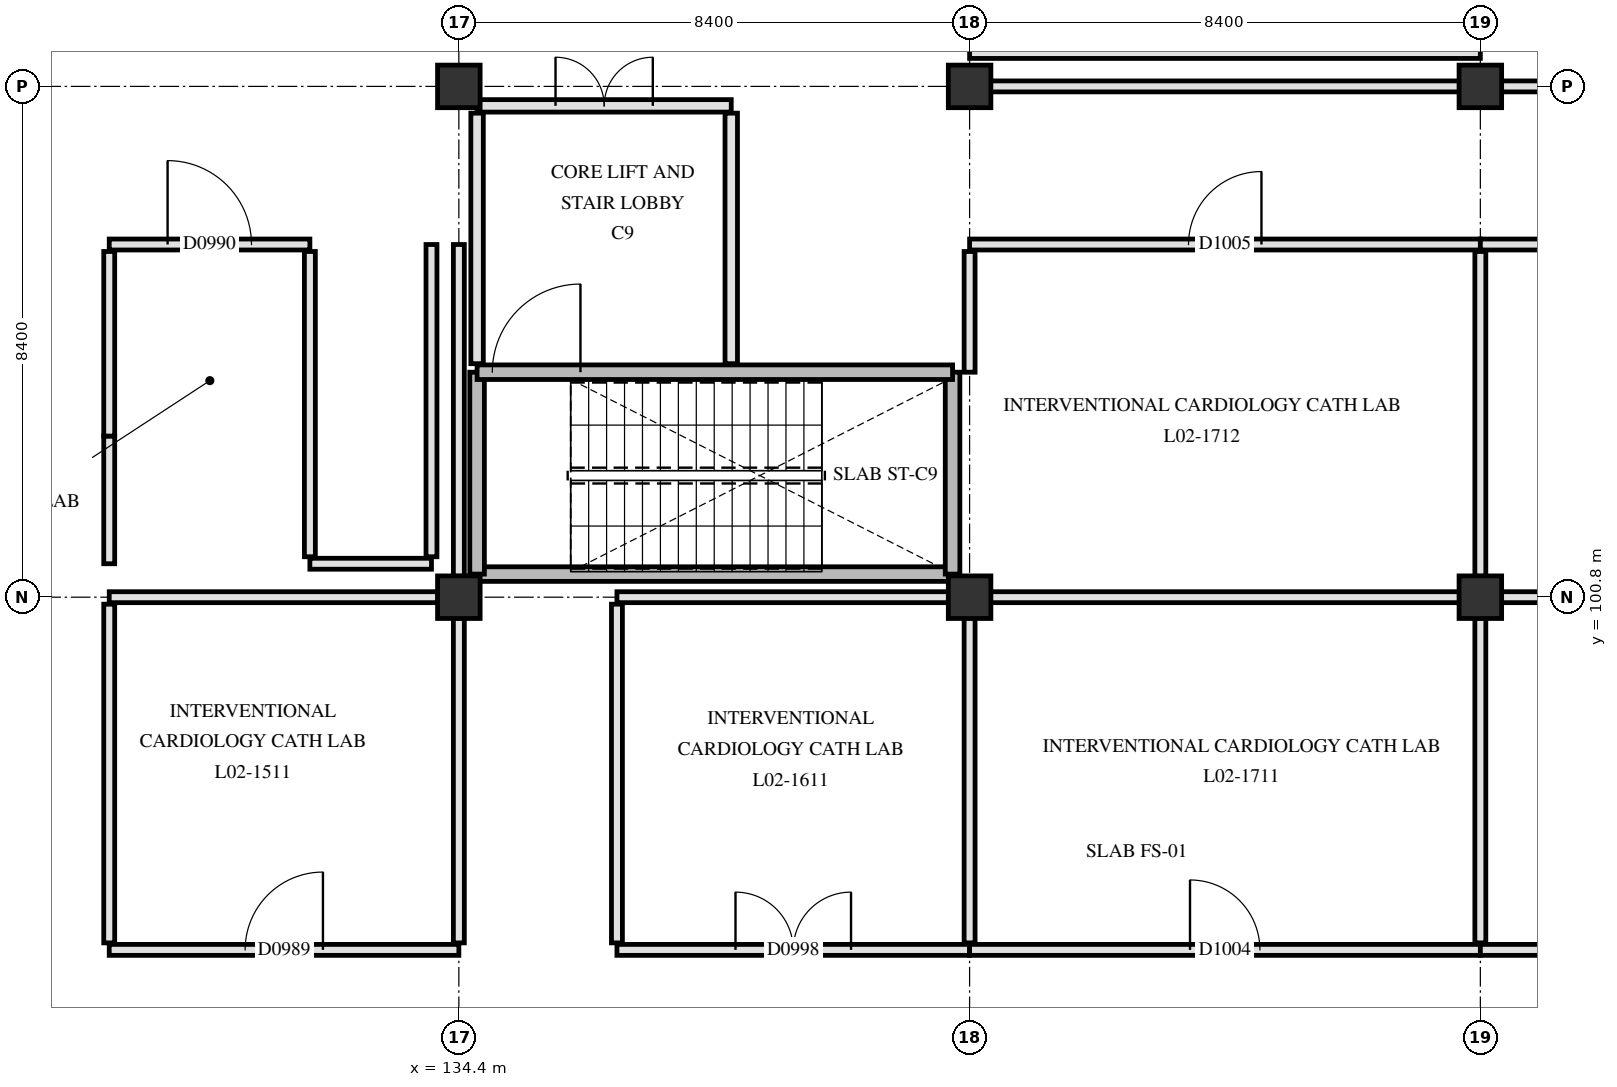
"""IFC4 building model, lengths in metres.
Left out: names, types, materials, properties, quantities, classifications, styles, units other than length and angle.
Written with IfcOpenShell. Run it as: python <this file> out.ifc"""

import sys

from ifc_helpers import new_model, si_unit, direction, frame, frame_2d, origin, origin_2d, place, context, subcontext, project, spatial, rectangle, extrude, element, fill, save


model = new_model("IFC4")
c1 = context("Model", 3, precision=1e-05, world=origin(), true_north=direction((0.0, 1.0)))
c2 = subcontext(c1, "Body", "Model", "MODEL_VIEW")
j1 = project(units=[si_unit("LENGTHUNIT", "METRE"), si_unit("PLANEANGLEUNIT", "RADIAN")], contexts=[c1])
p1 = place(None, origin())
s1 = spatial("IfcSite", under=j1, at=p1, CompositionType="ELEMENT")
p2 = place(p1, origin())
s2 = spatial("IfcBuilding", under=s1, at=p2, CompositionType="ELEMENT")
p3 = place(p2, frame((0.0, 0.0, 9.3)))
s3 = spatial("IfcBuildingStorey", under=s2, at=p3, CompositionType="ELEMENT", Elevation=9.3)
for number, where, z_axis, x_axis in (
    (1, (134.4, 100.8, 0.0), (0.0, 0.0, 1.0), (1.0, 0.0, 0.0)),
    (2, (134.4, 109.2, 0.0), (0.0, 0.0, 1.0), (1.0, 0.0, 0.0)),
    (3, (142.8, 100.8, 0.0), (0.0, 0.0, 1.0), (1.0, 0.0, 0.0)),
    (4, (142.8, 109.2, 0.0), (0.0, 0.0, 1.0), (1.0, 0.0, 0.0)),
    (5, (151.2, 100.8, 0.0), (0.0, 0.0, 1.0), (1.0, 0.0, 0.0)),
    (6, (151.2, 109.2, 0.0), (0.0, 0.0, 1.0), (1.0, 0.0, 0.0)),
):
    element("IfcColumn", number, at=place(p3, frame(where, z_axis=z_axis, x_axis=x_axis)), inside=s3, PredefinedType="COLUMN", context=c2, shape_type="SweptSolid", body=[
        extrude(rectangle(XDim=0.7, YDim=0.7, at=origin_2d()), origin(), (0.0, 0.0, 1.0), 5.1),
    ])
p4 = place(p3, frame((134.7, 101.18, 0.0), z_axis=(0.0, 0.0, 1.0), x_axis=(1.0, 0.0, 0.0)))
e7 = element("IfcWall", 7, at=p4, inside=s3, PredefinedType="SHEAR", context=c2, shape_type="SweptSolid", body=[
    extrude(rectangle(XDim=7.82, YDim=0.24, at=frame_2d((3.91, 0.0))), origin(), (0.0, 0.0, 1.0), 4.78),
])
for number, where, z_axis, x_axis in (
    (8, (134.7, 101.18, 0.0), (0.0, 0.0, 1.0), (0.0, 1.0, 0.0)),
    (9, (142.52, 101.18, 0.0), (0.0, 0.0, 1.0), (0.0, 1.0, 0.0)),
):
    element("IfcWall", number, at=place(p3, frame(where, z_axis=z_axis, x_axis=x_axis)), inside=s3, PredefinedType="SHEAR", context=c2, shape_type="SweptSolid", body=[
        extrude(rectangle(XDim=3.32, YDim=0.24, at=frame_2d((1.66, 0.0))), origin(), (0.0, 0.0, 1.0), 4.78),
    ])
p5 = place(p3, frame((134.7, 104.5, 0.0), z_axis=(0.0, 0.0, 1.0), x_axis=(1.0, 0.0, 0.0)))
e10 = element("IfcWall", 10, at=p5, inside=s3, PredefinedType="SHEAR", context=c2, shape_type="SweptSolid", body=[
    extrude(rectangle(XDim=7.82, YDim=0.24, at=frame_2d((3.91, 0.0))), origin(), (0.0, 0.0, 1.0), 4.78),
])
p6 = place(p5, frame((0.25, 0.0, 0.0)))
e11 = element("IfcOpeningElement", 11, at=p6, cuts=e10, PredefinedType="OPENING", context=c2, shape_type="SweptSolid", body=[
    extrude(rectangle(XDim=1.45, YDim=2.2, at=frame_2d((0.725, 1.1))), frame((0.0, 0.13, 0.0), z_axis=(0.0, -1.0, 0.0), x_axis=(1.0, 0.0, 0.0)), (0.0, 0.0, 1.0), 0.26),
])
p7 = place(p3, frame((138.88, 104.64, 0.0), z_axis=(0.0, 0.0, 1.0), x_axis=(0.0, 1.0, 0.0)))
e12 = element("IfcWall", 12, at=p7, inside=s3, PredefinedType="PARTITIONING", context=c2, shape_type="SweptSolid", body=[
    extrude(rectangle(XDim=4.12, YDim=0.205, at=frame_2d((2.06, 0.0))), origin(), (0.0, 0.0, 1.0), 4.77),
])
p8 = place(p3, frame((134.7, 104.64, 0.0), z_axis=(0.0, 0.0, 1.0), x_axis=(0.0, 1.0, 0.0)))
e13 = element("IfcWall", 13, at=p8, inside=s3, PredefinedType="PARTITIONING", context=c2, shape_type="SweptSolid", body=[
    extrude(rectangle(XDim=4.12, YDim=0.205, at=frame_2d((2.06, 0.0))), origin(), (0.0, 0.0, 1.0), 4.17),
])
p9 = place(p3, frame((134.7, 108.88, 0.0), z_axis=(0.0, 0.0, 1.0), x_axis=(1.0, 0.0, 0.0)))
e14 = element("IfcWall", 14, at=p9, inside=s3, PredefinedType="PARTITIONING", context=c2, shape_type="SweptSolid", body=[
    extrude(rectangle(XDim=4.18, YDim=0.205, at=frame_2d((2.09, 0.0))), origin(), (0.0, 0.0, 1.0), 4.17),
])
p10 = place(p9, frame((1.29, 0.0, 0.0)))
e15 = element("IfcOpeningElement", 15, at=p10, cuts=e14, PredefinedType="OPENING", context=c2, shape_type="SweptSolid", body=[
    extrude(rectangle(XDim=1.6, YDim=2.25, at=frame_2d((0.8, 1.125))), frame((0.0, 0.113, 0.0), z_axis=(0.0, -1.0, 0.0), x_axis=(1.0, 0.0, 0.0)), (0.0, 0.0, 1.0), 0.225),
])
p11 = place(p3, frame((128.65, 95.0, 0.0), z_axis=(0.0, 0.0, 1.0), x_axis=(1.0, 0.0, 0.0)))
e16 = element("IfcWall", 16, at=p11, inside=s3, PredefinedType="PARTITIONING", context=c2, shape_type="SweptSolid", body=[
    extrude(rectangle(XDim=5.75, YDim=0.18, at=frame_2d((2.875, 0.0))), origin(), (0.0, 0.0, 1.0), 4.17),
])
p12 = place(p11, frame((2.235, 0.0, 0.0)))
e17 = element("IfcOpeningElement", 17, at=p12, cuts=e16, PredefinedType="OPENING", context=c2, shape_type="SweptSolid", body=[
    extrude(rectangle(XDim=1.28, YDim=2.18, at=frame_2d((0.64, 1.09))), frame((0.0, 0.1, 0.0), z_axis=(0.0, -1.0, 0.0), x_axis=(1.0, 0.0, 0.0)), (0.0, 0.0, 1.0), 0.2),
])
p13 = place(p3, frame((137.0, 95.0, 0.0), z_axis=(0.0, 0.0, 1.0), x_axis=(1.0, 0.0, 0.0)))
e18 = element("IfcWall", 18, at=p13, inside=s3, PredefinedType="PARTITIONING", context=c2, shape_type="SweptSolid", body=[
    extrude(rectangle(XDim=5.8, YDim=0.18, at=frame_2d((2.9, 0.0))), origin(), (0.0, 0.0, 1.0), 4.17),
])
p14 = place(p13, frame((1.95, 0.0, 0.0)))
e19 = element("IfcOpeningElement", 19, at=p14, cuts=e18, PredefinedType="OPENING", context=c2, shape_type="SweptSolid", body=[
    extrude(rectangle(XDim=1.9, YDim=2.3, at=frame_2d((0.95, 1.15))), frame((0.0, 0.1, 0.0), z_axis=(0.0, -1.0, 0.0), x_axis=(1.0, 0.0, 0.0)), (0.0, 0.0, 1.0), 0.2),
])
p15 = place(p3, frame((142.8, 95.0, 0.0), z_axis=(0.0, 0.0, 1.0), x_axis=(1.0, 0.0, 0.0)))
e20 = element("IfcWall", 20, at=p15, inside=s3, PredefinedType="PARTITIONING", context=c2, shape_type="SweptSolid", body=[
    extrude(rectangle(XDim=8.4, YDim=0.18, at=frame_2d((4.2, 0.0))), origin(), (0.0, 0.0, 1.0), 4.17),
])
p16 = place(p15, frame((3.625, 0.0, 0.0)))
e21 = element("IfcOpeningElement", 21, at=p16, cuts=e20, PredefinedType="OPENING", context=c2, shape_type="SweptSolid", body=[
    extrude(rectangle(XDim=1.15, YDim=2.15, at=frame_2d((0.575, 1.075))), frame((0.0, 0.1, 0.0), z_axis=(0.0, -1.0, 0.0), x_axis=(1.0, 0.0, 0.0)), (0.0, 0.0, 1.0), 0.2),
])
p17 = place(p3, frame((151.2, 95.0, 0.0), z_axis=(0.0, 0.0, 1.0), x_axis=(1.0, 0.0, 0.0)))
e22 = element("IfcWall", 22, at=p17, inside=s3, PredefinedType="PARTITIONING", context=c2, shape_type="SweptSolid", body=[
    extrude(rectangle(XDim=8.4, YDim=0.18, at=frame_2d((4.2, 0.0))), origin(), (0.0, 0.0, 1.0), 4.17),
])
p18 = place(p17, frame((3.33, 0.0, 0.0)))
e23 = element("IfcOpeningElement", 23, at=p18, cuts=e22, PredefinedType="OPENING", context=c2, shape_type="SweptSolid", body=[
    extrude(rectangle(XDim=1.74, YDim=2.24, at=frame_2d((0.87, 1.12))), frame((0.0, 0.1, 0.0), z_axis=(0.0, -1.0, 0.0), x_axis=(1.0, 0.0, 0.0)), (0.0, 0.0, 1.0), 0.2),
])
p19 = place(p3, frame((128.65, 100.8, 0.0), z_axis=(0.0, 0.0, 1.0), x_axis=(1.0, 0.0, 0.0)))
e24 = element("IfcWall", 24, at=p19, inside=s3, PredefinedType="PARTITIONING", context=c2, shape_type="SweptSolid", body=[
    extrude(rectangle(XDim=5.405, YDim=0.18, at=frame_2d((2.703, 0.0))), origin(), (0.0, 0.0, 1.0), 4.17),
])
p20 = place(p3, frame((137.0, 100.8, 0.0), z_axis=(0.0, 0.0, 1.0), x_axis=(1.0, 0.0, 0.0)))
e25 = element("IfcWall", 25, at=p20, inside=s3, PredefinedType="PARTITIONING", context=c2, shape_type="SweptSolid", body=[
    extrude(rectangle(XDim=5.455, YDim=0.18, at=frame_2d((2.728, 0.0))), origin(), (0.0, 0.0, 1.0), 4.17),
])
p21 = place(p3, frame((143.145, 100.8, 0.0), z_axis=(0.0, 0.0, 1.0), x_axis=(1.0, 0.0, 0.0)))
e26 = element("IfcWall", 26, at=p21, inside=s3, PredefinedType="PARTITIONING", context=c2, shape_type="SweptSolid", body=[
    extrude(rectangle(XDim=7.71, YDim=0.18, at=frame_2d((3.855, 0.0))), origin(), (0.0, 0.0, 1.0), 4.17),
])
p22 = place(p3, frame((151.545, 100.8, 0.0), z_axis=(0.0, 0.0, 1.0), x_axis=(1.0, 0.0, 0.0)))
e27 = element("IfcWall", 27, at=p22, inside=s3, PredefinedType="PARTITIONING", context=c2, shape_type="SweptSolid", body=[
    extrude(rectangle(XDim=7.76, YDim=0.18, at=frame_2d((3.88, 0.0))), origin(), (0.0, 0.0, 1.0), 4.17),
])
p23 = place(p3, frame((131.95, 101.35, 0.0), z_axis=(0.0, 0.0, 1.0), x_axis=(1.0, 0.0, 0.0)))
e28 = element("IfcWall", 28, at=p23, inside=s3, PredefinedType="PARTITIONING", context=c2, shape_type="SweptSolid", body=[
    extrude(rectangle(XDim=2.0, YDim=0.18, at=frame_2d((1.0, 0.0))), origin(), (0.0, 0.0, 1.0), 4.77),
])
p24 = place(p3, frame((128.65, 106.6, 0.0), z_axis=(0.0, 0.0, 1.0), x_axis=(1.0, 0.0, 0.0)))
e29 = element("IfcWall", 29, at=p24, inside=s3, PredefinedType="PARTITIONING", context=c2, shape_type="SweptSolid", body=[
    extrude(rectangle(XDim=3.3, YDim=0.18, at=frame_2d((1.65, 0.0))), origin(), (0.0, 0.0, 1.0), 4.77),
])
p25 = place(p24, frame((0.96, 0.0, 0.0)))
e30 = element("IfcOpeningElement", 30, at=p25, cuts=e29, PredefinedType="OPENING", context=c2, shape_type="SweptSolid", body=[
    extrude(rectangle(XDim=1.38, YDim=2.22, at=frame_2d((0.69, 1.11))), frame((0.0, 0.1, 0.0), z_axis=(0.0, -1.0, 0.0), x_axis=(1.0, 0.0, 0.0)), (0.0, 0.0, 1.0), 0.2),
])
p26 = place(p3, frame((142.8, 106.6, 0.0), z_axis=(0.0, 0.0, 1.0), x_axis=(1.0, 0.0, 0.0)))
e31 = element("IfcWall", 31, at=p26, inside=s3, PredefinedType="PARTITIONING", context=c2, shape_type="SweptSolid", body=[
    extrude(rectangle(XDim=8.4, YDim=0.18, at=frame_2d((4.2, 0.0))), origin(), (0.0, 0.0, 1.0), 4.17),
])
p27 = place(p26, frame((3.6, 0.0, 0.0)))
e32 = element("IfcOpeningElement", 32, at=p27, cuts=e31, PredefinedType="OPENING", context=c2, shape_type="SweptSolid", body=[
    extrude(rectangle(XDim=1.2, YDim=2.15, at=frame_2d((0.6, 1.075))), frame((0.0, 0.1, 0.0), z_axis=(0.0, -1.0, 0.0), x_axis=(1.0, 0.0, 0.0)), (0.0, 0.0, 1.0), 0.2),
])
p28 = place(p3, frame((151.2, 106.6, 0.0), z_axis=(0.0, 0.0, 1.0), x_axis=(1.0, 0.0, 0.0)))
e33 = element("IfcWall", 33, at=p28, inside=s3, PredefinedType="PARTITIONING", context=c2, shape_type="SweptSolid", body=[
    extrude(rectangle(XDim=8.4, YDim=0.18, at=frame_2d((4.2, 0.0))), origin(), (0.0, 0.0, 1.0), 4.17),
])
p29 = place(p28, frame((3.28, 0.0, 0.0)))
e34 = element("IfcOpeningElement", 34, at=p29, cuts=e33, PredefinedType="OPENING", context=c2, shape_type="SweptSolid", body=[
    extrude(rectangle(XDim=1.84, YDim=2.28, at=frame_2d((0.92, 1.14))), frame((0.0, 0.1, 0.0), z_axis=(0.0, -1.0, 0.0), x_axis=(1.0, 0.0, 0.0)), (0.0, 0.0, 1.0), 0.2),
])
p30 = place(p3, frame((143.145, 109.2, 0.0), z_axis=(0.0, 0.0, 1.0), x_axis=(1.0, 0.0, 0.0)))
e35 = element("IfcWall", 35, at=p30, inside=s3, PredefinedType="PARTITIONING", context=c2, shape_type="SweptSolid", body=[
    extrude(rectangle(XDim=7.71, YDim=0.18, at=frame_2d((3.855, 0.0))), origin(), (0.0, 0.0, 1.0), 4.17),
])
p31 = place(p3, frame((151.545, 109.2, 0.0), z_axis=(0.0, 0.0, 1.0), x_axis=(1.0, 0.0, 0.0)))
e36 = element("IfcWall", 36, at=p31, inside=s3, PredefinedType="PARTITIONING", context=c2, shape_type="SweptSolid", body=[
    extrude(rectangle(XDim=7.76, YDim=0.18, at=frame_2d((3.88, 0.0))), origin(), (0.0, 0.0, 1.0), 4.17),
])
p32 = place(p31, frame((3.37, 0.0, 0.0)))
e37 = element("IfcOpeningElement", 37, at=p32, cuts=e36, PredefinedType="OPENING", context=c2, shape_type="SweptSolid", body=[
    extrude(rectangle(XDim=1.02, YDim=2.12, at=frame_2d((0.51, 1.06))), frame((0.0, 0.1, 0.0), z_axis=(0.0, -1.0, 0.0), x_axis=(1.0, 0.0, 0.0)), (0.0, 0.0, 1.0), 0.2),
])
p33 = place(p3, frame((142.8, 109.75, 0.0), z_axis=(0.0, 0.0, 1.0), x_axis=(1.0, 0.0, 0.0)))
e38 = element("IfcWall", 38, at=p33, inside=s3, PredefinedType="PARTITIONING", context=c2, shape_type="SweptSolid", body=[
    extrude(rectangle(XDim=8.4, YDim=0.18, at=frame_2d((4.2, 0.0))), origin(), (0.0, 0.0, 1.0), 4.17),
])
p34 = place(p3, frame((128.65, 95.115, 0.0), z_axis=(0.0, 0.0, 1.0), x_axis=(0.0, 1.0, 0.0)))
e39 = element("IfcWall", 39, at=p34, inside=s3, PredefinedType="PARTITIONING", context=c2, shape_type="SweptSolid", body=[
    extrude(rectangle(XDim=5.57, YDim=0.18, at=frame_2d((2.785, 0.0))), origin(), (0.0, 0.0, 1.0), 4.17),
])
p35 = place(p3, frame((128.65, 101.35, 0.0), z_axis=(0.0, 0.0, 1.0), x_axis=(0.0, 1.0, 0.0)))
e40 = element("IfcWall", 40, at=p35, inside=s3, PredefinedType="PARTITIONING", context=c2, shape_type="SweptSolid", body=[
    extrude(rectangle(XDim=2.1, YDim=0.18, at=frame_2d((1.05, 0.0))), origin(), (0.0, 0.0, 1.0), 4.77),
])
p36 = place(p3, frame((128.65, 103.45, 0.0), z_axis=(0.0, 0.0, 1.0), x_axis=(0.0, 1.0, 0.0)))
e41 = element("IfcWall", 41, at=p36, inside=s3, PredefinedType="PARTITIONING", context=c2, shape_type="SweptSolid", body=[
    extrude(rectangle(XDim=3.035, YDim=0.18, at=frame_2d((1.518, 0.0))), origin(), (0.0, 0.0, 1.0), 4.77),
])
p37 = place(p3, frame((131.95, 101.465, 0.0), z_axis=(0.0, 0.0, 1.0), x_axis=(0.0, 1.0, 0.0)))
e42 = element("IfcWall", 42, at=p37, inside=s3, PredefinedType="PARTITIONING", context=c2, shape_type="SweptSolid", body=[
    extrude(rectangle(XDim=5.02, YDim=0.18, at=frame_2d((2.51, 0.0))), origin(), (0.0, 0.0, 1.0), 4.77),
])
p38 = place(p3, frame((133.95, 101.465, 0.0), z_axis=(0.0, 0.0, 1.0), x_axis=(0.0, 1.0, 0.0)))
e43 = element("IfcWall", 43, at=p38, inside=s3, PredefinedType="PARTITIONING", context=c2, shape_type="SweptSolid", body=[
    extrude(rectangle(XDim=5.135, YDim=0.18, at=frame_2d((2.567, 0.0))), origin(), (0.0, 0.0, 1.0), 4.77),
])
p39 = place(p3, frame((134.4, 95.115, 0.0), z_axis=(0.0, 0.0, 1.0), x_axis=(0.0, 1.0, 0.0)))
e44 = element("IfcWall", 44, at=p39, inside=s3, PredefinedType="PARTITIONING", context=c2, shape_type="SweptSolid", body=[
    extrude(rectangle(XDim=5.34, YDim=0.18, at=frame_2d((2.67, 0.0))), origin(), (0.0, 0.0, 1.0), 4.17),
])
p40 = place(p3, frame((134.4, 101.145, 0.0), z_axis=(0.0, 0.0, 1.0), x_axis=(0.0, 1.0, 0.0)))
e45 = element("IfcWall", 45, at=p40, inside=s3, PredefinedType="PARTITIONING", context=c2, shape_type="SweptSolid", body=[
    extrude(rectangle(XDim=5.455, YDim=0.18, at=frame_2d((2.728, 0.0))), origin(), (0.0, 0.0, 1.0), 4.17),
])
p41 = place(p3, frame((137.0, 95.115, 0.0), z_axis=(0.0, 0.0, 1.0), x_axis=(0.0, 1.0, 0.0)))
e46 = element("IfcWall", 46, at=p41, inside=s3, PredefinedType="PARTITIONING", context=c2, shape_type="SweptSolid", body=[
    extrude(rectangle(XDim=5.57, YDim=0.18, at=frame_2d((2.785, 0.0))), origin(), (0.0, 0.0, 1.0), 4.17),
])
p42 = place(p3, frame((142.8, 95.115, 0.0), z_axis=(0.0, 0.0, 1.0), x_axis=(0.0, 1.0, 0.0)))
e47 = element("IfcWall", 47, at=p42, inside=s3, PredefinedType="PARTITIONING", context=c2, shape_type="SweptSolid", body=[
    extrude(rectangle(XDim=5.34, YDim=0.18, at=frame_2d((2.67, 0.0))), origin(), (0.0, 0.0, 1.0), 4.17),
])
p43 = place(p3, frame((142.8, 104.5, 0.0), z_axis=(0.0, 0.0, 1.0), x_axis=(0.0, 1.0, 0.0)))
e48 = element("IfcWall", 48, at=p43, inside=s3, PredefinedType="PARTITIONING", context=c2, shape_type="SweptSolid", body=[
    extrude(rectangle(XDim=1.985, YDim=0.18, at=frame_2d((0.993, 0.0))), origin(), (0.0, 0.0, 1.0), 4.17),
])
for number, where, z_axis, x_axis in (
    (49, (151.2, 95.115, 0.0), (0.0, 0.0, 1.0), (0.0, 1.0, 0.0)),
    (50, (151.2, 101.145, 0.0), (0.0, 0.0, 1.0), (0.0, 1.0, 0.0)),
):
    element("IfcWall", number, at=place(p3, frame(where, z_axis=z_axis, x_axis=x_axis)), inside=s3, PredefinedType="PARTITIONING", context=c2, shape_type="SweptSolid", body=[
        extrude(rectangle(XDim=5.34, YDim=0.18, at=frame_2d((2.67, 0.0))), origin(), (0.0, 0.0, 1.0), 4.17),
    ])
p44 = place(p6, origin())
e51 = element("IfcDoor", 51, at=p44, inside=s3, OperationType="SINGLE_SWING_RIGHT", PredefinedType="DOOR", context=c2, shape_type="SweptSolid", body=[
    extrude(rectangle(XDim=1.45, YDim=2.2, at=frame_2d((0.725, 1.1))), frame((0.0, 0.025, 0.0), z_axis=(0.0, -1.0, 0.0), x_axis=(1.0, 0.0, 0.0)), (0.0, 0.0, 1.0), 0.05),
])
fill(e11, e51)
p45 = place(p10, origin())
e52 = element("IfcDoor", 52, at=p45, inside=s3, OperationType="DOUBLE_SWING_LEFT", PredefinedType="DOOR", context=c2, shape_type="SweptSolid", body=[
    extrude(rectangle(XDim=1.6, YDim=2.25, at=frame_2d((0.8, 1.125))), frame((0.0, 0.025, 0.0), z_axis=(0.0, -1.0, 0.0), x_axis=(1.0, 0.0, 0.0)), (0.0, 0.0, 1.0), 0.05),
])
fill(e15, e52)
p46 = place(p12, origin())
e53 = element("IfcDoor", 53, at=p46, inside=s3, OperationType="SINGLE_SWING_RIGHT", PredefinedType="DOOR", context=c2, shape_type="SweptSolid", body=[
    extrude(rectangle(XDim=1.28, YDim=2.18, at=frame_2d((0.64, 1.09))), frame((0.0, 0.025, 0.0), z_axis=(0.0, -1.0, 0.0), x_axis=(1.0, 0.0, 0.0)), (0.0, 0.0, 1.0), 0.05),
])
fill(e17, e53)
p47 = place(p25, origin())
e54 = element("IfcDoor", 54, at=p47, inside=s3, OperationType="SINGLE_SWING_LEFT", PredefinedType="DOOR", context=c2, shape_type="SweptSolid", body=[
    extrude(rectangle(XDim=1.38, YDim=2.22, at=frame_2d((0.69, 1.11))), frame((0.0, 0.025, 0.0), z_axis=(0.0, -1.0, 0.0), x_axis=(1.0, 0.0, 0.0)), (0.0, 0.0, 1.0), 0.05),
])
fill(e30, e54)
p48 = place(p14, origin())
e55 = element("IfcDoor", 55, at=p48, inside=s3, OperationType="DOUBLE_SWING_LEFT", PredefinedType="DOOR", context=c2, shape_type="SweptSolid", body=[
    extrude(rectangle(XDim=1.9, YDim=2.3, at=frame_2d((0.95, 1.15))), frame((0.0, 0.025, 0.0), z_axis=(0.0, -1.0, 0.0), x_axis=(1.0, 0.0, 0.0)), (0.0, 0.0, 1.0), 0.05),
])
fill(e19, e55)
p49 = place(p16, origin())
e56 = element("IfcDoor", 56, at=p49, inside=s3, OperationType="SINGLE_SWING_LEFT", PredefinedType="DOOR", context=c2, shape_type="SweptSolid", body=[
    extrude(rectangle(XDim=1.15, YDim=2.15, at=frame_2d((0.575, 1.075))), frame((0.0, 0.025, 0.0), z_axis=(0.0, -1.0, 0.0), x_axis=(1.0, 0.0, 0.0)), (0.0, 0.0, 1.0), 0.05),
])
fill(e21, e56)
p50 = place(p27, origin())
e57 = element("IfcDoor", 57, at=p50, inside=s3, OperationType="SINGLE_SWING_RIGHT", PredefinedType="DOOR", context=c2, shape_type="SweptSolid", body=[
    extrude(rectangle(XDim=1.2, YDim=2.15, at=frame_2d((0.6, 1.075))), frame((0.0, 0.025, 0.0), z_axis=(0.0, -1.0, 0.0), x_axis=(1.0, 0.0, 0.0)), (0.0, 0.0, 1.0), 0.05),
])
fill(e32, e57)
save(model, sys.argv[1])
